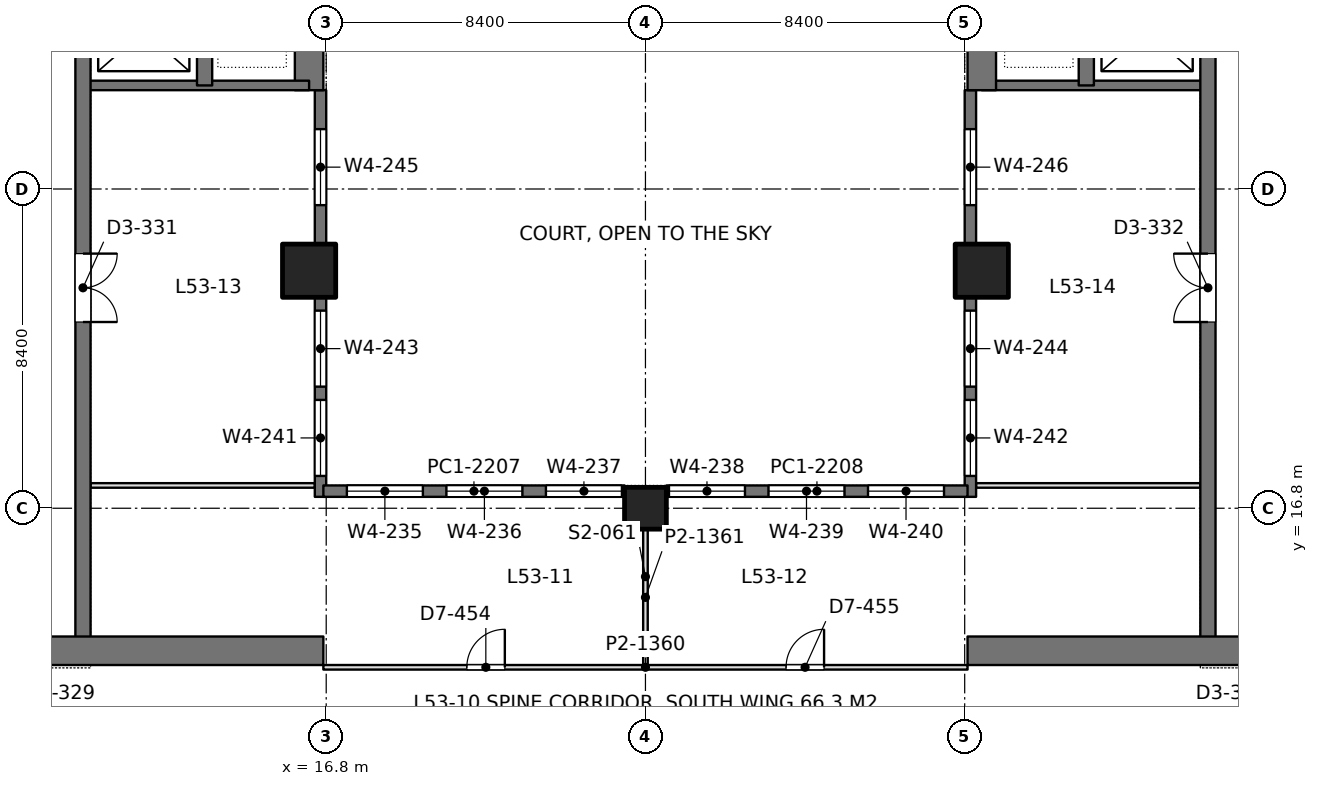
"""IFC4 building model, lengths in metres.
Left out: names, types, materials, properties, quantities, classifications, styles, units other than length and angle.
Written with IfcOpenShell. Run it as: python <this file> out.ifc"""

import sys

from ifc_helpers import new_model, si_unit, direction, frame, frame_2d, origin, origin_2d, place, context, subcontext, project, spatial, rectangle, extrude, element, fill, save


model = new_model("IFC4")
c1 = context("Model", 3, precision=1e-05, world=origin(), true_north=direction((0.0, 1.0)))
c2 = subcontext(c1, "Body", "Model", "MODEL_VIEW")
j1 = project(units=[si_unit("LENGTHUNIT", "METRE"), si_unit("PLANEANGLEUNIT", "RADIAN")], contexts=[c1])
p1 = place(None, origin())
s1 = spatial("IfcSite", under=j1, at=p1, CompositionType="ELEMENT")
p2 = place(p1, origin())
s2 = spatial("IfcBuilding", under=s1, at=p2, CompositionType="ELEMENT")
p3 = place(p2, frame((0.0, 0.0, 232.2)))
s3 = spatial("IfcBuildingStorey", under=s2, at=p3, CompositionType="ELEMENT", Elevation=232.2)
p4 = place(p3, frame((25.2, 16.8, 0.0), z_axis=(0.0, 0.0, 1.0), x_axis=(1.0, 0.0, 0.0)))
e1 = element("IfcColumn", 1, at=p4, inside=s3, PredefinedType="COLUMN", context=c2, shape_type="SweptSolid", body=[
    extrude(rectangle(XDim=1.1, YDim=1.1, at=origin_2d()), origin(), (0.0, 0.0, 1.0), 4.2),
])
for number, where, z_axis, x_axis in (
    (2, (16.35, 23.05, 0.0), (0.0, 0.0, 1.0), (1.0, 0.0, 0.0)),
    (3, (34.05, 23.05, 0.0), (0.0, 0.0, 1.0), (1.0, 0.0, 0.0)),
):
    element("IfcColumn", number, at=place(p3, frame(where, z_axis=z_axis, x_axis=x_axis)), inside=s3, PredefinedType="COLUMN", context=c2, shape_type="SweptSolid", body=[
        extrude(rectangle(XDim=1.4, YDim=1.4, at=origin_2d()), origin(), (0.0, 0.0, 1.0), 4.2),
    ])
p5 = place(p3, frame((-1.125, 13.05, 0.0), z_axis=(0.0, 0.0, 1.0), x_axis=(1.0, 0.0, 0.0)))
e4 = element("IfcWall", 4, at=p5, inside=s3, PredefinedType="SHEAR", context=c2, shape_type="SweptSolid", body=[
    extrude(rectangle(XDim=17.85, YDim=0.75, at=frame_2d((8.925, 0.0))), origin(), (0.0, 0.0, 1.0), 4.2),
])
p6 = place(p5, frame((8.875, 0.0, 0.0)))
e5 = element("IfcOpeningElement", 5, at=p6, cuts=e4, PredefinedType="OPENING", context=c2, shape_type="SweptSolid", body=[
    extrude(rectangle(XDim=1.8, YDim=2.4, at=frame_2d((0.9, 1.2))), frame((0.0, 0.385, 0.0), z_axis=(0.0, -1.0, 0.0), x_axis=(1.0, 0.0, 0.0)), (0.0, 0.0, 1.0), 0.77),
])
p7 = place(p3, frame((16.35, 27.8, 0.0), z_axis=(0.0, 0.0, 1.0), x_axis=(0.0, 1.0, 0.0)))
e6 = element("IfcWall", 6, at=p7, inside=s3, PredefinedType="SHEAR", context=c2, shape_type="SweptSolid", body=[
    extrude(rectangle(XDim=9.55, YDim=0.75, at=frame_2d((4.775, 0.0))), origin(), (0.0, 0.0, 1.0), 4.2),
])
p8 = place(p3, frame((10.4, 13.05, 0.0), z_axis=(0.0, 0.0, 1.0), x_axis=(0.0, 1.0, 0.0)))
e7 = element("IfcWall", 7, at=p8, inside=s3, PredefinedType="SHEAR", context=c2, shape_type="SweptSolid", body=[
    extrude(rectangle(XDim=24.3, YDim=0.4, at=frame_2d((12.15, 0.0))), origin(), (0.0, 0.0, 1.0), 4.2),
])
p9 = place(p8, frame((15.75, 0.0, 0.0)))
e8 = element("IfcOpeningElement", 8, at=p9, cuts=e7, PredefinedType="OPENING", context=c2, shape_type="SweptSolid", body=[
    extrude(rectangle(XDim=1.1, YDim=2.2, at=frame_2d((0.55, 1.1))), frame((0.0, 0.21, 0.0), z_axis=(0.0, -1.0, 0.0), x_axis=(1.0, 0.0, 0.0)), (0.0, 0.0, 1.0), 0.42),
])
p10 = place(p8, frame((18.6, 0.0, 0.0)))
e9 = element("IfcOpeningElement", 9, at=p10, cuts=e7, PredefinedType="OPENING", context=c2, shape_type="SweptSolid", body=[
    extrude(rectangle(XDim=1.1, YDim=2.2, at=frame_2d((0.55, 1.1))), frame((0.0, 0.21, 0.0), z_axis=(0.0, -1.0, 0.0), x_axis=(1.0, 0.0, 0.0)), (0.0, 0.0, 1.0), 0.42),
])
p11 = place(p8, frame((21.45, 0.0, 0.0)))
e10 = element("IfcOpeningElement", 10, at=p11, cuts=e7, PredefinedType="OPENING", context=c2, shape_type="SweptSolid", body=[
    extrude(rectangle(XDim=1.1, YDim=2.2, at=frame_2d((0.55, 1.1))), frame((0.0, 0.21, 0.0), z_axis=(0.0, -1.0, 0.0), x_axis=(1.0, 0.0, 0.0)), (0.0, 0.0, 1.0), 0.42),
])
p12 = place(p8, frame((8.65, 0.0, 0.0)))
e11 = element("IfcOpeningElement", 11, at=p12, cuts=e7, PredefinedType="OPENING", context=c2, shape_type="SweptSolid", body=[
    extrude(rectangle(XDim=1.8, YDim=2.4, at=frame_2d((0.9, 1.2))), frame((0.0, 0.21, 0.0), z_axis=(0.0, -1.0, 0.0), x_axis=(1.0, 0.0, 0.0)), (0.0, 0.0, 1.0), 0.42),
])
p13 = place(p3, frame((13.6, 27.925, 0.0), z_axis=(0.0, 0.0, 1.0), x_axis=(0.0, 1.0, 0.0)))
e12 = element("IfcWall", 12, at=p13, inside=s3, PredefinedType="SHEAR", context=c2, shape_type="SweptSolid", body=[
    extrude(rectangle(XDim=9.425, YDim=0.4, at=frame_2d((4.712, 0.0))), origin(), (0.0, 0.0, 1.0), 4.2),
])
p14 = place(p3, frame((10.4, 27.925, 0.0), z_axis=(0.0, 0.0, 1.0), x_axis=(1.0, 0.0, 0.0)))
e13 = element("IfcWall", 13, at=p14, inside=s3, PredefinedType="SHEAR", context=c2, shape_type="SweptSolid", body=[
    extrude(rectangle(XDim=5.95, YDim=0.25, at=frame_2d((2.975, 0.0))), origin(), (0.0, 0.0, 1.0), 4.2),
])
p15 = place(p3, frame((33.675, 13.05, 0.0), z_axis=(0.0, 0.0, 1.0), x_axis=(1.0, 0.0, 0.0)))
e14 = element("IfcWall", 14, at=p15, inside=s3, PredefinedType="SHEAR", context=c2, shape_type="SweptSolid", body=[
    extrude(rectangle(XDim=17.85, YDim=0.75, at=frame_2d((8.925, 0.0))), origin(), (0.0, 0.0, 1.0), 4.2),
])
p16 = place(p15, frame((7.175, 0.0, 0.0)))
e15 = element("IfcOpeningElement", 15, at=p16, cuts=e14, PredefinedType="OPENING", context=c2, shape_type="SweptSolid", body=[
    extrude(rectangle(XDim=1.8, YDim=2.4, at=frame_2d((0.9, 1.2))), frame((0.0, 0.385, 0.0), z_axis=(0.0, -1.0, 0.0), x_axis=(1.0, 0.0, 0.0)), (0.0, 0.0, 1.0), 0.77),
])
p17 = place(p3, frame((34.05, 27.8, 0.0), z_axis=(0.0, 0.0, 1.0), x_axis=(0.0, 1.0, 0.0)))
e16 = element("IfcWall", 16, at=p17, inside=s3, PredefinedType="SHEAR", context=c2, shape_type="SweptSolid", body=[
    extrude(rectangle(XDim=9.55, YDim=0.75, at=frame_2d((4.775, 0.0))), origin(), (0.0, 0.0, 1.0), 4.2),
])
p18 = place(p3, frame((40.0, 13.05, 0.0), z_axis=(0.0, 0.0, 1.0), x_axis=(0.0, 1.0, 0.0)))
e17 = element("IfcWall", 17, at=p18, inside=s3, PredefinedType="SHEAR", context=c2, shape_type="SweptSolid", body=[
    extrude(rectangle(XDim=24.3, YDim=0.4, at=frame_2d((12.15, 0.0))), origin(), (0.0, 0.0, 1.0), 4.2),
])
p19 = place(p18, frame((15.75, 0.0, 0.0)))
e18 = element("IfcOpeningElement", 18, at=p19, cuts=e17, PredefinedType="OPENING", context=c2, shape_type="SweptSolid", body=[
    extrude(rectangle(XDim=1.1, YDim=2.2, at=frame_2d((0.55, 1.1))), frame((0.0, 0.21, 0.0), z_axis=(0.0, -1.0, 0.0), x_axis=(1.0, 0.0, 0.0)), (0.0, 0.0, 1.0), 0.42),
])
p20 = place(p18, frame((18.6, 0.0, 0.0)))
e19 = element("IfcOpeningElement", 19, at=p20, cuts=e17, PredefinedType="OPENING", context=c2, shape_type="SweptSolid", body=[
    extrude(rectangle(XDim=1.1, YDim=2.2, at=frame_2d((0.55, 1.1))), frame((0.0, 0.21, 0.0), z_axis=(0.0, -1.0, 0.0), x_axis=(1.0, 0.0, 0.0)), (0.0, 0.0, 1.0), 0.42),
])
p21 = place(p18, frame((21.45, 0.0, 0.0)))
e20 = element("IfcOpeningElement", 20, at=p21, cuts=e17, PredefinedType="OPENING", context=c2, shape_type="SweptSolid", body=[
    extrude(rectangle(XDim=1.1, YDim=2.2, at=frame_2d((0.55, 1.1))), frame((0.0, 0.21, 0.0), z_axis=(0.0, -1.0, 0.0), x_axis=(1.0, 0.0, 0.0)), (0.0, 0.0, 1.0), 0.42),
])
p22 = place(p18, frame((8.65, 0.0, 0.0)))
e21 = element("IfcOpeningElement", 21, at=p22, cuts=e17, PredefinedType="OPENING", context=c2, shape_type="SweptSolid", body=[
    extrude(rectangle(XDim=1.8, YDim=2.4, at=frame_2d((0.9, 1.2))), frame((0.0, 0.21, 0.0), z_axis=(0.0, -1.0, 0.0), x_axis=(1.0, 0.0, 0.0)), (0.0, 0.0, 1.0), 0.42),
])
p23 = place(p3, frame((36.8, 27.925, 0.0), z_axis=(0.0, 0.0, 1.0), x_axis=(0.0, 1.0, 0.0)))
e22 = element("IfcWall", 22, at=p23, inside=s3, PredefinedType="SHEAR", context=c2, shape_type="SweptSolid", body=[
    extrude(rectangle(XDim=9.425, YDim=0.4, at=frame_2d((4.712, 0.0))), origin(), (0.0, 0.0, 1.0), 4.2),
])
p24 = place(p3, frame((40.0, 27.925, 0.0), z_axis=(0.0, 0.0, 1.0), x_axis=(-1.0, 0.0, 0.0)))
e23 = element("IfcWall", 23, at=p24, inside=s3, PredefinedType="SHEAR", context=c2, shape_type="SweptSolid", body=[
    extrude(rectangle(XDim=5.95, YDim=0.25, at=frame_2d((2.975, 0.0))), origin(), (0.0, 0.0, 1.0), 4.2),
])
p25 = place(p3, frame((16.65, 17.1, 0.0), z_axis=(0.0, 0.0, 1.0), x_axis=(0.0, 1.0, 0.0)))
e24 = element("IfcWall", 24, at=p25, inside=s3, PredefinedType="SOLIDWALL", context=c2, shape_type="SweptSolid", body=[
    extrude(rectangle(XDim=10.7, YDim=0.3, at=frame_2d((5.35, 0.0))), origin(), (0.0, 0.0, 1.0), 4.05),
])
p26 = place(p25, frame((0.55, 0.0, 0.9)))
e25 = element("IfcOpeningElement", 25, at=p26, cuts=e24, PredefinedType="OPENING", context=c2, shape_type="SweptSolid", body=[
    extrude(rectangle(XDim=2.0, YDim=1.9, at=frame_2d((1.0, 0.95))), frame((0.0, 0.16, 0.0), z_axis=(0.0, -1.0, 0.0), x_axis=(1.0, 0.0, 0.0)), (0.0, 0.0, 1.0), 0.32),
])
p27 = place(p25, frame((2.9, 0.0, 0.9)))
e26 = element("IfcOpeningElement", 26, at=p27, cuts=e24, PredefinedType="OPENING", context=c2, shape_type="SweptSolid", body=[
    extrude(rectangle(XDim=2.0, YDim=1.9, at=frame_2d((1.0, 0.95))), frame((0.0, 0.16, 0.0), z_axis=(0.0, -1.0, 0.0), x_axis=(1.0, 0.0, 0.0)), (0.0, 0.0, 1.0), 0.32),
])
p28 = place(p25, frame((7.675, 0.0, 0.9)))
e27 = element("IfcOpeningElement", 27, at=p28, cuts=e24, PredefinedType="OPENING", context=c2, shape_type="SweptSolid", body=[
    extrude(rectangle(XDim=2.0, YDim=1.9, at=frame_2d((1.0, 0.95))), frame((0.0, 0.16, 0.0), z_axis=(0.0, -1.0, 0.0), x_axis=(1.0, 0.0, 0.0)), (0.0, 0.0, 1.0), 0.32),
])
p29 = place(p3, frame((33.75, 17.1, 0.0), z_axis=(0.0, 0.0, 1.0), x_axis=(0.0, 1.0, 0.0)))
e28 = element("IfcWall", 28, at=p29, inside=s3, PredefinedType="SOLIDWALL", context=c2, shape_type="SweptSolid", body=[
    extrude(rectangle(XDim=10.7, YDim=0.3, at=frame_2d((5.35, 0.0))), origin(), (0.0, 0.0, 1.0), 4.05),
])
p30 = place(p29, frame((0.55, 0.0, 0.9)))
e29 = element("IfcOpeningElement", 29, at=p30, cuts=e28, PredefinedType="OPENING", context=c2, shape_type="SweptSolid", body=[
    extrude(rectangle(XDim=2.0, YDim=1.9, at=frame_2d((1.0, 0.95))), frame((0.0, 0.16, 0.0), z_axis=(0.0, -1.0, 0.0), x_axis=(1.0, 0.0, 0.0)), (0.0, 0.0, 1.0), 0.32),
])
p31 = place(p29, frame((2.9, 0.0, 0.9)))
e30 = element("IfcOpeningElement", 30, at=p31, cuts=e28, PredefinedType="OPENING", context=c2, shape_type="SweptSolid", body=[
    extrude(rectangle(XDim=2.0, YDim=1.9, at=frame_2d((1.0, 0.95))), frame((0.0, 0.16, 0.0), z_axis=(0.0, -1.0, 0.0), x_axis=(1.0, 0.0, 0.0)), (0.0, 0.0, 1.0), 0.32),
])
p32 = place(p29, frame((7.675, 0.0, 0.9)))
e31 = element("IfcOpeningElement", 31, at=p32, cuts=e28, PredefinedType="OPENING", context=c2, shape_type="SweptSolid", body=[
    extrude(rectangle(XDim=2.0, YDim=1.9, at=frame_2d((1.0, 0.95))), frame((0.0, 0.16, 0.0), z_axis=(0.0, -1.0, 0.0), x_axis=(1.0, 0.0, 0.0)), (0.0, 0.0, 1.0), 0.32),
])
p33 = place(p3, frame((16.725, 17.25, 0.0), z_axis=(0.0, 0.0, 1.0), x_axis=(1.0, 0.0, 0.0)))
e32 = element("IfcWall", 32, at=p33, inside=s3, PredefinedType="SOLIDWALL", context=c2, shape_type="SweptSolid", body=[
    extrude(rectangle(XDim=7.925, YDim=0.3, at=frame_2d((3.962, 0.0))), origin(), (0.0, 0.0, 1.0), 4.05),
])
p34 = place(p33, frame((0.619, 0.0, 0.9)))
e33 = element("IfcOpeningElement", 33, at=p34, cuts=e32, PredefinedType="OPENING", context=c2, shape_type="SweptSolid", body=[
    extrude(rectangle(XDim=2.0, YDim=1.9, at=frame_2d((1.0, 0.95))), frame((0.0, 0.16, 0.0), z_axis=(0.0, -1.0, 0.0), x_axis=(1.0, 0.0, 0.0)), (0.0, 0.0, 1.0), 0.32),
])
p35 = place(p33, frame((3.238, 0.0, 0.9)))
e34 = element("IfcOpeningElement", 34, at=p35, cuts=e32, PredefinedType="OPENING", context=c2, shape_type="SweptSolid", body=[
    extrude(rectangle(XDim=2.0, YDim=1.9, at=frame_2d((1.0, 0.95))), frame((0.0, 0.16, 0.0), z_axis=(0.0, -1.0, 0.0), x_axis=(1.0, 0.0, 0.0)), (0.0, 0.0, 1.0), 0.32),
])
p36 = place(p33, frame((5.856, 0.0, 0.9)))
e35 = element("IfcOpeningElement", 35, at=p36, cuts=e32, PredefinedType="OPENING", context=c2, shape_type="SweptSolid", body=[
    extrude(rectangle(XDim=2.0, YDim=1.9, at=frame_2d((1.0, 0.95))), frame((0.0, 0.16, 0.0), z_axis=(0.0, -1.0, 0.0), x_axis=(1.0, 0.0, 0.0)), (0.0, 0.0, 1.0), 0.32),
])
p37 = place(p3, frame((25.75, 17.25, 0.0), z_axis=(0.0, 0.0, 1.0), x_axis=(1.0, 0.0, 0.0)))
e36 = element("IfcWall", 36, at=p37, inside=s3, PredefinedType="SOLIDWALL", context=c2, shape_type="SweptSolid", body=[
    extrude(rectangle(XDim=7.925, YDim=0.3, at=frame_2d((3.962, 0.0))), origin(), (0.0, 0.0, 1.0), 4.05),
])
p38 = place(p37, frame((0.069, 0.0, 0.9)))
e37 = element("IfcOpeningElement", 37, at=p38, cuts=e36, PredefinedType="OPENING", context=c2, shape_type="SweptSolid", body=[
    extrude(rectangle(XDim=2.0, YDim=1.9, at=frame_2d((1.0, 0.95))), frame((0.0, 0.16, 0.0), z_axis=(0.0, -1.0, 0.0), x_axis=(1.0, 0.0, 0.0)), (0.0, 0.0, 1.0), 0.32),
])
p39 = place(p37, frame((2.688, 0.0, 0.9)))
e38 = element("IfcOpeningElement", 38, at=p39, cuts=e36, PredefinedType="OPENING", context=c2, shape_type="SweptSolid", body=[
    extrude(rectangle(XDim=2.0, YDim=1.9, at=frame_2d((1.0, 0.95))), frame((0.0, 0.16, 0.0), z_axis=(0.0, -1.0, 0.0), x_axis=(1.0, 0.0, 0.0)), (0.0, 0.0, 1.0), 0.32),
])
p40 = place(p37, frame((5.306, 0.0, 0.9)))
e39 = element("IfcOpeningElement", 39, at=p40, cuts=e36, PredefinedType="OPENING", context=c2, shape_type="SweptSolid", body=[
    extrude(rectangle(XDim=2.0, YDim=1.9, at=frame_2d((1.0, 0.95))), frame((0.0, 0.16, 0.0), z_axis=(0.0, -1.0, 0.0), x_axis=(1.0, 0.0, 0.0)), (0.0, 0.0, 1.0), 0.32),
])
for number, where, z_axis, x_axis in (
    (40, (10.598, 17.4, 0.0), (0.0, 0.0, 1.0), (1.0, 0.0, 0.0)),
    (41, (33.898, 17.4, 0.0), (0.0, 0.0, 1.0), (1.0, 0.0, 0.0)),
):
    element("IfcWall", number, at=place(p3, frame(where, z_axis=z_axis, x_axis=x_axis)), inside=s3, PredefinedType="PARTITIONING", context=c2, shape_type="SweptSolid", body=[
        extrude(rectangle(XDim=5.904, YDim=0.12, at=frame_2d((2.952, 0.0))), origin(), (0.0, 0.0, 1.0), 3.55),
    ])
p41 = place(p3, frame((25.2, 12.658, 0.0), z_axis=(0.0, 0.0, 1.0), x_axis=(0.0, 1.0, 0.0)))
e42 = element("IfcWall", 42, at=p41, inside=s3, PredefinedType="PARTITIONING", context=c2, shape_type="SweptSolid", body=[
    extrude(rectangle(XDim=3.593, YDim=0.12, at=frame_2d((1.796, 0.0))), origin(), (0.0, 0.0, 1.0), 3.55),
])
p42 = place(p3, frame((16.725, 12.615, 0.0), z_axis=(0.0, 0.0, 1.0), x_axis=(1.0, 0.0, 0.0)))
e43 = element("IfcWall", 43, at=p42, inside=s3, PredefinedType="PARTITIONING", context=c2, shape_type="SweptSolid", body=[
    extrude(rectangle(XDim=16.95, YDim=0.12, at=frame_2d((8.475, 0.0))), origin(), (0.0, 0.0, 1.0), 3.55),
])
p43 = place(p42, frame((3.775, 0.0, 0.0)))
e44 = element("IfcOpeningElement", 44, at=p43, cuts=e43, PredefinedType="OPENING", context=c2, shape_type="SweptSolid", body=[
    extrude(rectangle(XDim=1.0, YDim=2.4, at=frame_2d((0.5, 1.2))), frame((0.0, 0.07, 0.0), z_axis=(0.0, -1.0, 0.0), x_axis=(1.0, 0.0, 0.0)), (0.0, 0.0, 1.0), 0.14),
])
p44 = place(p42, frame((12.175, 0.0, 0.0)))
e45 = element("IfcOpeningElement", 45, at=p44, cuts=e43, PredefinedType="OPENING", context=c2, shape_type="SweptSolid", body=[
    extrude(rectangle(XDim=1.0, YDim=2.4, at=frame_2d((0.5, 1.2))), frame((0.0, 0.07, 0.0), z_axis=(0.0, -1.0, 0.0), x_axis=(1.0, 0.0, 0.0)), (0.0, 0.0, 1.0), 0.14),
])
p45 = place(p26, origin())
e46 = element("IfcWindow", 46, at=p45, inside=s3, PartitioningType="SINGLE_PANEL", PredefinedType="WINDOW", context=c2, shape_type="SweptSolid", body=[
    extrude(rectangle(XDim=2.0, YDim=1.9, at=frame_2d((1.0, 0.95))), frame((0.0, 0.03, 0.0), z_axis=(0.0, -1.0, 0.0), x_axis=(1.0, 0.0, 0.0)), (0.0, 0.0, 1.0), 0.06),
])
fill(e25, e46)
p46 = place(p27, origin())
e47 = element("IfcWindow", 47, at=p46, inside=s3, PartitioningType="SINGLE_PANEL", PredefinedType="WINDOW", context=c2, shape_type="SweptSolid", body=[
    extrude(rectangle(XDim=2.0, YDim=1.9, at=frame_2d((1.0, 0.95))), frame((0.0, 0.03, 0.0), z_axis=(0.0, -1.0, 0.0), x_axis=(1.0, 0.0, 0.0)), (0.0, 0.0, 1.0), 0.06),
])
fill(e26, e47)
p47 = place(p28, origin())
e48 = element("IfcWindow", 48, at=p47, inside=s3, PartitioningType="SINGLE_PANEL", PredefinedType="WINDOW", context=c2, shape_type="SweptSolid", body=[
    extrude(rectangle(XDim=2.0, YDim=1.9, at=frame_2d((1.0, 0.95))), frame((0.0, 0.03, 0.0), z_axis=(0.0, -1.0, 0.0), x_axis=(1.0, 0.0, 0.0)), (0.0, 0.0, 1.0), 0.06),
])
fill(e27, e48)
p48 = place(p30, origin())
e49 = element("IfcWindow", 49, at=p48, inside=s3, PartitioningType="SINGLE_PANEL", PredefinedType="WINDOW", context=c2, shape_type="SweptSolid", body=[
    extrude(rectangle(XDim=2.0, YDim=1.9, at=frame_2d((1.0, 0.95))), frame((0.0, 0.03, 0.0), z_axis=(0.0, -1.0, 0.0), x_axis=(1.0, 0.0, 0.0)), (0.0, 0.0, 1.0), 0.06),
])
fill(e29, e49)
p49 = place(p31, origin())
e50 = element("IfcWindow", 50, at=p49, inside=s3, PartitioningType="SINGLE_PANEL", PredefinedType="WINDOW", context=c2, shape_type="SweptSolid", body=[
    extrude(rectangle(XDim=2.0, YDim=1.9, at=frame_2d((1.0, 0.95))), frame((0.0, 0.03, 0.0), z_axis=(0.0, -1.0, 0.0), x_axis=(1.0, 0.0, 0.0)), (0.0, 0.0, 1.0), 0.06),
])
fill(e30, e50)
p50 = place(p32, origin())
e51 = element("IfcWindow", 51, at=p50, inside=s3, PartitioningType="SINGLE_PANEL", PredefinedType="WINDOW", context=c2, shape_type="SweptSolid", body=[
    extrude(rectangle(XDim=2.0, YDim=1.9, at=frame_2d((1.0, 0.95))), frame((0.0, 0.03, 0.0), z_axis=(0.0, -1.0, 0.0), x_axis=(1.0, 0.0, 0.0)), (0.0, 0.0, 1.0), 0.06),
])
fill(e31, e51)
p51 = place(p34, origin())
e52 = element("IfcWindow", 52, at=p51, inside=s3, PartitioningType="SINGLE_PANEL", PredefinedType="WINDOW", context=c2, shape_type="SweptSolid", body=[
    extrude(rectangle(XDim=2.0, YDim=1.9, at=frame_2d((1.0, 0.95))), frame((0.0, 0.03, 0.0), z_axis=(0.0, -1.0, 0.0), x_axis=(1.0, 0.0, 0.0)), (0.0, 0.0, 1.0), 0.06),
])
fill(e33, e52)
p52 = place(p35, origin())
e53 = element("IfcWindow", 53, at=p52, inside=s3, PartitioningType="SINGLE_PANEL", PredefinedType="WINDOW", context=c2, shape_type="SweptSolid", body=[
    extrude(rectangle(XDim=2.0, YDim=1.9, at=frame_2d((1.0, 0.95))), frame((0.0, 0.03, 0.0), z_axis=(0.0, -1.0, 0.0), x_axis=(1.0, 0.0, 0.0)), (0.0, 0.0, 1.0), 0.06),
])
fill(e34, e53)
p53 = place(p36, origin())
e54 = element("IfcWindow", 54, at=p53, inside=s3, PartitioningType="SINGLE_PANEL", PredefinedType="WINDOW", context=c2, shape_type="SweptSolid", body=[
    extrude(rectangle(XDim=2.0, YDim=1.9, at=frame_2d((1.0, 0.95))), frame((0.0, 0.03, 0.0), z_axis=(0.0, -1.0, 0.0), x_axis=(1.0, 0.0, 0.0)), (0.0, 0.0, 1.0), 0.06),
])
fill(e35, e54)
p54 = place(p38, origin())
e55 = element("IfcWindow", 55, at=p54, inside=s3, PartitioningType="SINGLE_PANEL", PredefinedType="WINDOW", context=c2, shape_type="SweptSolid", body=[
    extrude(rectangle(XDim=2.0, YDim=1.9, at=frame_2d((1.0, 0.95))), frame((0.0, 0.03, 0.0), z_axis=(0.0, -1.0, 0.0), x_axis=(1.0, 0.0, 0.0)), (0.0, 0.0, 1.0), 0.06),
])
fill(e37, e55)
p55 = place(p39, origin())
e56 = element("IfcWindow", 56, at=p55, inside=s3, PartitioningType="SINGLE_PANEL", PredefinedType="WINDOW", context=c2, shape_type="SweptSolid", body=[
    extrude(rectangle(XDim=2.0, YDim=1.9, at=frame_2d((1.0, 0.95))), frame((0.0, 0.03, 0.0), z_axis=(0.0, -1.0, 0.0), x_axis=(1.0, 0.0, 0.0)), (0.0, 0.0, 1.0), 0.06),
])
fill(e38, e56)
p56 = place(p40, origin())
e57 = element("IfcWindow", 57, at=p56, inside=s3, PartitioningType="SINGLE_PANEL", PredefinedType="WINDOW", context=c2, shape_type="SweptSolid", body=[
    extrude(rectangle(XDim=2.0, YDim=1.9, at=frame_2d((1.0, 0.95))), frame((0.0, 0.03, 0.0), z_axis=(0.0, -1.0, 0.0), x_axis=(1.0, 0.0, 0.0)), (0.0, 0.0, 1.0), 0.06),
])
fill(e39, e57)
p57 = place(p12, frame((1.8, 0.0, 0.0), z_axis=(0.0, 0.0, 1.0), x_axis=(-1.0, 0.0, 0.0)))
e58 = element("IfcDoor", 58, at=p57, inside=s3, OperationType="DOUBLE_DOOR_SINGLE_SWING", PredefinedType="DOOR", context=c2, shape_type="SweptSolid", body=[
    extrude(rectangle(XDim=1.8, YDim=2.4, at=frame_2d((0.9, 1.2))), frame((0.0, 0.025, 0.0), z_axis=(0.0, -1.0, 0.0), x_axis=(1.0, 0.0, 0.0)), (0.0, 0.0, 1.0), 0.05),
])
fill(e11, e58)
p58 = place(p22, origin())
e59 = element("IfcDoor", 59, at=p58, inside=s3, OperationType="DOUBLE_DOOR_SINGLE_SWING", PredefinedType="DOOR", context=c2, shape_type="SweptSolid", body=[
    extrude(rectangle(XDim=1.8, YDim=2.4, at=frame_2d((0.9, 1.2))), frame((0.0, 0.025, 0.0), z_axis=(0.0, -1.0, 0.0), x_axis=(1.0, 0.0, 0.0)), (0.0, 0.0, 1.0), 0.05),
])
fill(e21, e59)
p59 = place(p43, origin())
e60 = element("IfcDoor", 60, at=p59, inside=s3, OperationType="SINGLE_SWING_RIGHT", PredefinedType="DOOR", context=c2, shape_type="SweptSolid", body=[
    extrude(rectangle(XDim=1.0, YDim=2.4, at=frame_2d((0.5, 1.2))), frame((0.0, 0.025, 0.0), z_axis=(0.0, -1.0, 0.0), x_axis=(1.0, 0.0, 0.0)), (0.0, 0.0, 1.0), 0.05),
])
fill(e44, e60)
p60 = place(p44, origin())
e61 = element("IfcDoor", 61, at=p60, inside=s3, OperationType="SINGLE_SWING_RIGHT", PredefinedType="DOOR", context=c2, shape_type="SweptSolid", body=[
    extrude(rectangle(XDim=1.0, YDim=2.4, at=frame_2d((0.5, 1.2))), frame((0.0, 0.025, 0.0), z_axis=(0.0, -1.0, 0.0), x_axis=(1.0, 0.0, 0.0)), (0.0, 0.0, 1.0), 0.05),
])
fill(e45, e61)
save(model, sys.argv[1])
